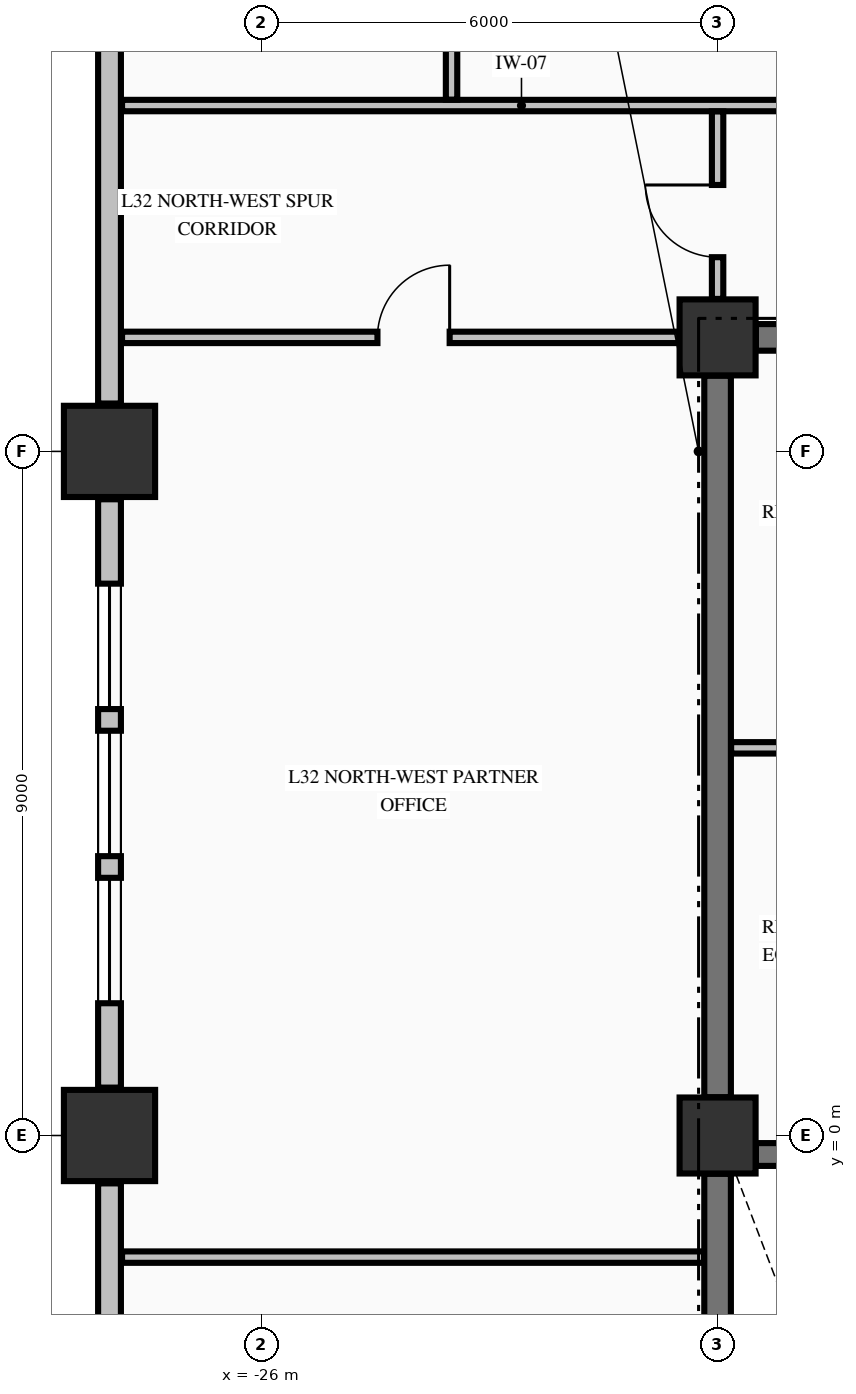
"""IFC4 building model, lengths in metres.
Left out: names, types, materials, properties, quantities, classifications, styles, units other than length and angle.
Written with IfcOpenShell. Run it as: python <this file> out.ifc"""

import sys

from ifc_helpers import new_model, si_unit, direction, frame, frame_2d, origin, origin_2d, place, context, subcontext, project, spatial, rectangle, extrude, element, fill, save


model = new_model("IFC4")
c1 = context("Model", 3, precision=1e-05, world=origin(), true_north=direction((0.0, 1.0)))
c2 = subcontext(c1, "Body", "Model", "MODEL_VIEW")
j1 = project(units=[si_unit("LENGTHUNIT", "METRE"), si_unit("PLANEANGLEUNIT", "RADIAN")], contexts=[c1])
p1 = place(None, origin())
s1 = spatial("IfcSite", under=j1, at=p1, CompositionType="ELEMENT")
p2 = place(p1, origin())
s2 = spatial("IfcBuilding", under=s1, at=p2, CompositionType="ELEMENT")
p3 = place(p2, frame((0.0, 0.0, 128.49)))
s3 = spatial("IfcBuildingStorey", under=s2, at=p3, CompositionType="ELEMENT", Elevation=128.49)
for number, where, z_axis, x_axis in (
    (1, (-28.0, 0.0, -0.25), (0.0, 0.0, 1.0), (1.0, 0.0, 0.0)),
    (2, (-28.0, 9.0, -0.25), (0.0, 0.0, 1.0), (1.0, 0.0, 0.0)),
):
    element("IfcColumn", number, at=place(p3, frame(where, z_axis=z_axis, x_axis=x_axis)), inside=s3, PredefinedType="COLUMN", context=c2, shape_type="SweptSolid", body=[
        extrude(rectangle(XDim=1.2, YDim=1.2, at=origin_2d()), origin(), (0.0, 0.0, 1.0), 3.57),
    ])
for number, where, z_axis, x_axis in (
    (3, (-20.0, 10.5, -0.25), (0.0, 0.0, 1.0), (1.0, 0.0, 0.0)),
    (4, (-20.0, 0.0, -0.25), (0.0, 0.0, 1.0), (1.0, 0.0, 0.0)),
):
    element("IfcColumn", number, at=place(p3, frame(where, z_axis=z_axis, x_axis=x_axis)), inside=s3, PredefinedType="COLUMN", context=c2, shape_type="SweptSolid", body=[
        extrude(rectangle(XDim=1.0, YDim=1.0, at=origin_2d()), origin(), (0.0, 0.0, 1.0), 3.57),
    ])
p4 = place(p3, frame((-28.0, -0.63, 0.0), z_axis=(0.0, 0.0, 1.0), x_axis=(0.0, -1.0, 0.0)))
e5 = element("IfcWall", 5, at=p4, inside=s3, PredefinedType="STANDARD", context=c2, shape_type="SweptSolid", body=[
    extrude(rectangle(XDim=7.74, YDim=0.3, at=frame_2d((3.87, 0.0))), origin(), (0.0, 0.0, 1.0), 2.712),
])
p5 = place(p4, frame((3.045, 0.0, 0.8)))
e6 = element("IfcOpeningElement", 6, at=p5, cuts=e5, PredefinedType="OPENING", context=c2, shape_type="SweptSolid", body=[
    extrude(rectangle(XDim=1.65, YDim=1.7, at=frame_2d((0.825, 0.85))), frame((0.0, 0.16, 0.0), z_axis=(0.0, -1.0, 0.0), x_axis=(1.0, 0.0, 0.0)), (0.0, 0.0, 1.0), 0.32),
])
p6 = place(p4, frame((4.98, 0.0, 0.8)))
e7 = element("IfcOpeningElement", 7, at=p6, cuts=e5, PredefinedType="OPENING", context=c2, shape_type="SweptSolid", body=[
    extrude(rectangle(XDim=1.65, YDim=1.7, at=frame_2d((0.825, 0.85))), frame((0.0, 0.16, 0.0), z_axis=(0.0, -1.0, 0.0), x_axis=(1.0, 0.0, 0.0)), (0.0, 0.0, 1.0), 0.32),
])
p7 = place(p3, frame((-28.0, 8.37, 0.0), z_axis=(0.0, 0.0, 1.0), x_axis=(0.0, -1.0, 0.0)))
e8 = element("IfcWall", 8, at=p7, inside=s3, PredefinedType="STANDARD", context=c2, shape_type="SweptSolid", body=[
    extrude(rectangle(XDim=7.74, YDim=0.3, at=frame_2d((3.87, 0.0))), origin(), (0.0, 0.0, 1.0), 2.712),
])
p8 = place(p7, frame((1.11, 0.0, 0.8)))
e9 = element("IfcOpeningElement", 9, at=p8, cuts=e8, PredefinedType="OPENING", context=c2, shape_type="SweptSolid", body=[
    extrude(rectangle(XDim=1.65, YDim=1.7, at=frame_2d((0.825, 0.85))), frame((0.0, 0.16, 0.0), z_axis=(0.0, -1.0, 0.0), x_axis=(1.0, 0.0, 0.0)), (0.0, 0.0, 1.0), 0.32),
])
p9 = place(p7, frame((3.045, 0.0, 0.8)))
e10 = element("IfcOpeningElement", 10, at=p9, cuts=e8, PredefinedType="OPENING", context=c2, shape_type="SweptSolid", body=[
    extrude(rectangle(XDim=1.65, YDim=1.7, at=frame_2d((0.825, 0.85))), frame((0.0, 0.16, 0.0), z_axis=(0.0, -1.0, 0.0), x_axis=(1.0, 0.0, 0.0)), (0.0, 0.0, 1.0), 0.32),
])
p10 = place(p7, frame((4.98, 0.0, 0.8)))
e11 = element("IfcOpeningElement", 11, at=p10, cuts=e8, PredefinedType="OPENING", context=c2, shape_type="SweptSolid", body=[
    extrude(rectangle(XDim=1.65, YDim=1.7, at=frame_2d((0.825, 0.85))), frame((0.0, 0.16, 0.0), z_axis=(0.0, -1.0, 0.0), x_axis=(1.0, 0.0, 0.0)), (0.0, 0.0, 1.0), 0.32),
])
p11 = place(p3, frame((-28.0, 20.37, 0.0), z_axis=(0.0, 0.0, 1.0), x_axis=(0.0, -1.0, 0.0)))
e12 = element("IfcWall", 12, at=p11, inside=s3, PredefinedType="STANDARD", context=c2, shape_type="SweptSolid", body=[
    extrude(rectangle(XDim=10.74, YDim=0.3, at=frame_2d((5.37, 0.0))), origin(), (0.0, 0.0, 1.0), 2.712),
])
p12 = place(p3, frame((-19.496, -0.25, 0.0), z_axis=(0.0, 0.0, 1.0), x_axis=(1.0, 0.0, 0.0)))
e13 = element("IfcWall", 13, at=p12, inside=s3, PredefinedType="SHEAR", context=c2, shape_type="SweptSolid", body=[
    extrude(rectangle(XDim=7.992, YDim=0.3, at=frame_2d((3.996, 0.0))), origin(), (0.0, 0.0, 1.0), 3.32),
])
p13 = place(p12, frame((5.796, 0.0, 0.0)))
e14 = element("IfcOpeningElement", 14, at=p13, cuts=e13, PredefinedType="OPENING", context=c2, shape_type="SweptSolid", body=[
    extrude(rectangle(XDim=1.1, YDim=2.15, at=frame_2d((0.55, 1.075))), frame((0.0, 0.16, 0.0), z_axis=(0.0, -1.0, 0.0), x_axis=(1.0, 0.0, 0.0)), (0.0, 0.0, 1.0), 0.32),
])
p14 = place(p3, frame((-19.496, 10.5, 0.0), z_axis=(0.0, 0.0, 1.0), x_axis=(1.0, 0.0, 0.0)))
e15 = element("IfcWall", 15, at=p14, inside=s3, PredefinedType="SHEAR", context=c2, shape_type="SweptSolid", body=[
    extrude(rectangle(XDim=4.796, YDim=0.35, at=frame_2d((2.398, 0.0))), origin(), (0.0, 0.0, 1.0), 3.32),
])
p15 = place(p14, frame((0.471, 0.0, 0.0)))
e16 = element("IfcOpeningElement", 16, at=p15, cuts=e15, PredefinedType="OPENING", context=c2, shape_type="SweptSolid", body=[
    extrude(rectangle(XDim=0.95, YDim=2.15, at=frame_2d((0.475, 1.075))), frame((0.0, 0.185, 0.0), z_axis=(0.0, -1.0, 0.0), x_axis=(1.0, 0.0, 0.0)), (0.0, 0.0, 1.0), 0.37),
])
p16 = place(p14, frame((3.046, 0.0, 0.0)))
e17 = element("IfcOpeningElement", 17, at=p16, cuts=e15, PredefinedType="OPENING", context=c2, shape_type="SweptSolid", body=[
    extrude(rectangle(XDim=0.9, YDim=2.15, at=frame_2d((0.45, 1.075))), frame((0.0, 0.185, 0.0), z_axis=(0.0, -1.0, 0.0), x_axis=(1.0, 0.0, 0.0)), (0.0, 0.0, 1.0), 0.37),
])
p17 = place(p3, frame((-27.835, -1.6, 0.0), z_axis=(0.0, 0.0, 1.0), x_axis=(1.0, 0.0, 0.0)))
e18 = element("IfcWall", 18, at=p17, inside=s3, PredefinedType="PARTITIONING", context=c2, shape_type="SweptSolid", body=[
    extrude(rectangle(XDim=7.657, YDim=0.15, at=frame_2d((3.829, 0.0))), origin(), (0.0, 0.0, 1.0), 3.32),
])
p18 = place(p3, frame((-19.822, 5.1, 0.0), z_axis=(0.0, 0.0, 1.0), x_axis=(1.0, 0.0, 0.0)))
e19 = element("IfcWall", 19, at=p18, inside=s3, PredefinedType="PARTITIONING", context=c2, shape_type="SweptSolid", body=[
    extrude(rectangle(XDim=2.547, YDim=0.15, at=frame_2d((1.273, 0.0))), origin(), (0.0, 0.0, 1.0), 3.32),
])
p19 = place(p18, frame((0.797, 0.0, 0.0)))
e20 = element("IfcOpeningElement", 20, at=p19, cuts=e19, PredefinedType="OPENING", context=c2, shape_type="SweptSolid", body=[
    extrude(rectangle(XDim=0.95, YDim=2.15, at=frame_2d((0.475, 1.075))), frame((0.0, 0.085, 0.0), z_axis=(0.0, -1.0, 0.0), x_axis=(1.0, 0.0, 0.0)), (0.0, 0.0, 1.0), 0.17),
])
p20 = place(p3, frame((-27.835, 10.5, 0.0), z_axis=(0.0, 0.0, 1.0), x_axis=(1.0, 0.0, 0.0)))
e21 = element("IfcWall", 21, at=p20, inside=s3, PredefinedType="PARTITIONING", context=c2, shape_type="SweptSolid", body=[
    extrude(rectangle(XDim=7.329, YDim=0.15, at=frame_2d((3.665, 0.0))), origin(), (0.0, 0.0, 1.0), 3.32),
])
p21 = place(p20, frame((3.36, 0.0, 0.0)))
e22 = element("IfcOpeningElement", 22, at=p21, cuts=e21, PredefinedType="OPENING", context=c2, shape_type="SweptSolid", body=[
    extrude(rectangle(XDim=0.95, YDim=2.15, at=frame_2d((0.475, 1.075))), frame((0.0, 0.085, 0.0), z_axis=(0.0, -1.0, 0.0), x_axis=(1.0, 0.0, 0.0)), (0.0, 0.0, 1.0), 0.17),
])
p22 = place(p3, frame((-27.835, 13.55, 0.0), z_axis=(0.0, 0.0, 1.0), x_axis=(1.0, 0.0, 0.0)))
e23 = element("IfcWall", 23, at=p22, inside=s3, PredefinedType="PARTITIONING", context=c2, shape_type="SweptSolid", body=[
    extrude(rectangle(XDim=50.67, YDim=0.15, at=frame_2d((25.335, 0.0))), origin(), (0.0, 0.0, 1.0), 3.32),
])
p23 = place(p22, frame((10.51, 0.0, 0.0)))
e24 = element("IfcOpeningElement", 24, at=p23, cuts=e23, PredefinedType="OPENING", context=c2, shape_type="SweptSolid", body=[
    extrude(rectangle(XDim=1.05, YDim=2.15, at=frame_2d((0.525, 1.075))), frame((0.0, 0.085, 0.0), z_axis=(0.0, -1.0, 0.0), x_axis=(1.0, 0.0, 0.0)), (0.0, 0.0, 1.0), 0.17),
])
p24 = place(p22, frame((15.16, 0.0, 0.0)))
e25 = element("IfcOpeningElement", 25, at=p24, cuts=e23, PredefinedType="OPENING", context=c2, shape_type="SweptSolid", body=[
    extrude(rectangle(XDim=1.05, YDim=2.15, at=frame_2d((0.525, 1.075))), frame((0.0, 0.085, 0.0), z_axis=(0.0, -1.0, 0.0), x_axis=(1.0, 0.0, 0.0)), (0.0, 0.0, 1.0), 0.17),
])
p25 = place(p22, frame((24.91, 0.0, 0.0)))
e26 = element("IfcOpeningElement", 26, at=p25, cuts=e23, PredefinedType="OPENING", context=c2, shape_type="SweptSolid", body=[
    extrude(rectangle(XDim=1.05, YDim=2.15, at=frame_2d((0.525, 1.075))), frame((0.0, 0.085, 0.0), z_axis=(0.0, -1.0, 0.0), x_axis=(1.0, 0.0, 0.0)), (0.0, 0.0, 1.0), 0.17),
])
p26 = place(p22, frame((32.81, 0.0, 0.0)))
e27 = element("IfcOpeningElement", 27, at=p26, cuts=e23, PredefinedType="OPENING", context=c2, shape_type="SweptSolid", body=[
    extrude(rectangle(XDim=1.05, YDim=2.15, at=frame_2d((0.525, 1.075))), frame((0.0, 0.085, 0.0), z_axis=(0.0, -1.0, 0.0), x_axis=(1.0, 0.0, 0.0)), (0.0, 0.0, 1.0), 0.17),
])
p27 = place(p22, frame((41.36, 0.0, 0.0)))
e28 = element("IfcOpeningElement", 28, at=p27, cuts=e23, PredefinedType="OPENING", context=c2, shape_type="SweptSolid", body=[
    extrude(rectangle(XDim=1.05, YDim=2.15, at=frame_2d((0.525, 1.075))), frame((0.0, 0.085, 0.0), z_axis=(0.0, -1.0, 0.0), x_axis=(1.0, 0.0, 0.0)), (0.0, 0.0, 1.0), 0.17),
])
p28 = place(p3, frame((-20.0, -9.446, 0.0), z_axis=(0.0, 0.0, 1.0), x_axis=(0.0, 1.0, 0.0)))
e29 = element("IfcWall", 29, at=p28, inside=s3, PredefinedType="SHEAR", context=c2, shape_type="SweptSolid", body=[
    extrude(rectangle(XDim=8.942, YDim=0.35, at=frame_2d((4.471, 0.0))), origin(), (0.0, 0.0, 1.0), 3.32),
])
p29 = place(p3, frame((-20.0, 0.504, 0.0), z_axis=(0.0, 0.0, 1.0), x_axis=(0.0, 1.0, 0.0)))
e30 = element("IfcWall", 30, at=p29, inside=s3, PredefinedType="SHEAR", context=c2, shape_type="SweptSolid", body=[
    extrude(rectangle(XDim=9.492, YDim=0.35, at=frame_2d((4.746, 0.0))), origin(), (0.0, 0.0, 1.0), 3.32),
])
p30 = place(p3, frame((-23.5, 13.628, 0.0), z_axis=(0.0, 0.0, 1.0), x_axis=(0.0, 1.0, 0.0)))
e31 = element("IfcWall", 31, at=p30, inside=s3, PredefinedType="PARTITIONING", context=c2, shape_type="SweptSolid", body=[
    extrude(rectangle(XDim=6.766, YDim=0.15, at=frame_2d((3.383, 0.0))), origin(), (0.0, 0.0, 1.0), 3.32),
])
p31 = place(p3, frame((-20.0, 11.006, 0.0), z_axis=(0.0, 0.0, 1.0), x_axis=(0.0, 1.0, 0.0)))
e32 = element("IfcWall", 32, at=p31, inside=s3, PredefinedType="PARTITIONING", context=c2, shape_type="SweptSolid", body=[
    extrude(rectangle(XDim=2.466, YDim=0.15, at=frame_2d((1.233, 0.0))), origin(), (0.0, 0.0, 1.0), 2.81),
])
p32 = place(p31, frame((0.549, 0.0, 0.0)))
e33 = element("IfcOpeningElement", 33, at=p32, cuts=e32, PredefinedType="OPENING", context=c2, shape_type="SweptSolid", body=[
    extrude(rectangle(XDim=0.95, YDim=2.15, at=frame_2d((0.475, 1.075))), frame((0.0, 0.085, 0.0), z_axis=(0.0, -1.0, 0.0), x_axis=(1.0, 0.0, 0.0)), (0.0, 0.0, 1.0), 0.17),
])
p33 = place(p8, origin())
e34 = element("IfcWindow", 34, at=p33, inside=s3, PartitioningType="SINGLE_PANEL", PredefinedType="WINDOW", context=c2, shape_type="SweptSolid", body=[
    extrude(rectangle(XDim=1.65, YDim=1.7, at=frame_2d((0.825, 0.85))), frame((0.0, 0.03, 0.0), z_axis=(0.0, -1.0, 0.0), x_axis=(1.0, 0.0, 0.0)), (0.0, 0.0, 1.0), 0.06),
])
fill(e9, e34)
p34 = place(p9, origin())
e35 = element("IfcWindow", 35, at=p34, inside=s3, PartitioningType="SINGLE_PANEL", PredefinedType="WINDOW", context=c2, shape_type="SweptSolid", body=[
    extrude(rectangle(XDim=1.65, YDim=1.7, at=frame_2d((0.825, 0.85))), frame((0.0, 0.03, 0.0), z_axis=(0.0, -1.0, 0.0), x_axis=(1.0, 0.0, 0.0)), (0.0, 0.0, 1.0), 0.06),
])
fill(e10, e35)
p35 = place(p10, origin())
e36 = element("IfcWindow", 36, at=p35, inside=s3, PartitioningType="SINGLE_PANEL", PredefinedType="WINDOW", context=c2, shape_type="SweptSolid", body=[
    extrude(rectangle(XDim=1.65, YDim=1.7, at=frame_2d((0.825, 0.85))), frame((0.0, 0.03, 0.0), z_axis=(0.0, -1.0, 0.0), x_axis=(1.0, 0.0, 0.0)), (0.0, 0.0, 1.0), 0.06),
])
fill(e11, e36)
p36 = place(p32, origin())
e37 = element("IfcDoor", 37, at=p36, inside=s3, OperationType="SINGLE_SWING_RIGHT", PredefinedType="DOOR", context=c2, shape_type="SweptSolid", body=[
    extrude(rectangle(XDim=0.95, YDim=2.15, at=frame_2d((0.475, 1.075))), frame((0.0, 0.025, 0.0), z_axis=(0.0, -1.0, 0.0), x_axis=(1.0, 0.0, 0.0)), (0.0, 0.0, 1.0), 0.05),
])
fill(e33, e37)
p37 = place(p21, origin())
e38 = element("IfcDoor", 38, at=p37, inside=s3, OperationType="SINGLE_SWING_RIGHT", PredefinedType="DOOR", context=c2, shape_type="SweptSolid", body=[
    extrude(rectangle(XDim=0.95, YDim=2.15, at=frame_2d((0.475, 1.075))), frame((0.0, 0.025, 0.0), z_axis=(0.0, -1.0, 0.0), x_axis=(1.0, 0.0, 0.0)), (0.0, 0.0, 1.0), 0.05),
])
fill(e22, e38)
save(model, sys.argv[1])
